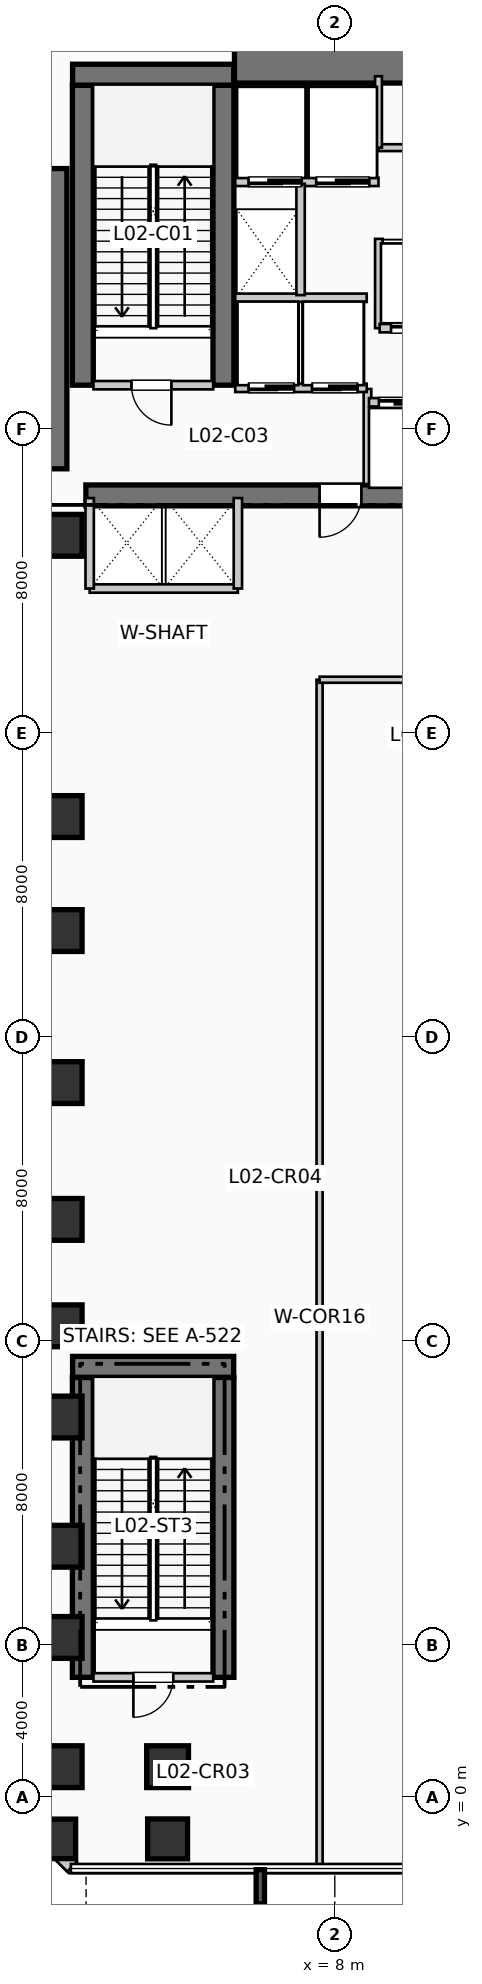
"""IFC4 building model, lengths in metres.
Left out: names, types, materials, properties, quantities, classifications, styles, units other than length and angle.
Written with IfcOpenShell. Run it as: python <this file> out.ifc"""

import sys

from ifc_helpers import new_model, si_unit, direction, frame, frame_2d, origin, origin_2d, place, context, subcontext, project, spatial, rectangle, extrude, element, fill, save


model = new_model("IFC4")
c1 = context("Model", 3, precision=1e-05, world=origin(), true_north=direction((0.0, 1.0)))
c2 = subcontext(c1, "Body", "Model", "MODEL_VIEW")
j1 = project(units=[si_unit("LENGTHUNIT", "METRE"), si_unit("PLANEANGLEUNIT", "RADIAN")], contexts=[c1])
p1 = place(None, origin())
s1 = spatial("IfcSite", under=j1, at=p1, CompositionType="ELEMENT")
p2 = place(p1, origin())
s2 = spatial("IfcBuilding", under=s1, at=p2, CompositionType="ELEMENT")
p3 = place(p2, frame((0.0, 0.0, 11.22)))
s3 = spatial("IfcBuildingStorey", under=s2, at=p3, CompositionType="ELEMENT", Elevation=11.22)
p4 = place(p3, frame((5.36, 45.55, 0.0), z_axis=(0.0, 0.0, 1.0), x_axis=(1.0, 0.0, 0.0)))
e1 = element("IfcWall", 1, at=p4, inside=s3, PredefinedType="SHEAR", context=c2, shape_type="SweptSolid", body=[
    extrude(rectangle(XDim=13.98, YDim=0.9, at=frame_2d((6.99, 0.0))), origin(), (0.0, 0.0, 1.0), 5.28),
])
p5 = place(p3, frame((0.5, 34.95, 0.0), z_axis=(0.0, 0.0, 1.0), x_axis=(0.0, 1.0, 0.0)))
e2 = element("IfcWall", 2, at=p5, inside=s3, PredefinedType="SHEAR", context=c2, shape_type="SweptSolid", body=[
    extrude(rectangle(XDim=7.9, YDim=0.9, at=frame_2d((3.95, 0.0))), origin(), (0.0, 0.0, 1.0), 5.28),
])
p6 = place(p3, frame((1.45, 34.25, 0.0), z_axis=(0.0, 0.0, 1.0), x_axis=(1.0, 0.0, 0.0)))
e3 = element("IfcWall", 3, at=p6, inside=s3, PredefinedType="SHEAR", context=c2, shape_type="SweptSolid", body=[
    extrude(rectangle(XDim=10.71, YDim=0.55, at=frame_2d((5.355, 0.0))), origin(), (0.0, 0.0, 1.0), 5.28),
])
p7 = place(p6, frame((7.25, 0.0, 0.0), z_axis=(0.0, 0.0, 1.0), x_axis=(-1.0, 0.0, 0.0)))
e4 = element("IfcOpeningElement", 4, at=p7, cuts=e3, PredefinedType="OPENING", context=c2, shape_type="SweptSolid", body=[
    extrude(rectangle(XDim=1.1, YDim=2.15, at=frame_2d((0.55, 1.075))), frame((0.0, 0.285, 0.0), z_axis=(0.0, -1.0, 0.0), x_axis=(1.0, 0.0, 0.0)), (0.0, 0.0, 1.0), 0.57),
])
for number, where, z_axis, x_axis in (
    (5, (1.37, 37.15, 0.0), (0.0, 0.0, 1.0), (0.0, 1.0, 0.0)),
    (6, (5.07, 37.15, 0.0), (0.0, 0.0, 1.0), (0.0, 1.0, 0.0)),
):
    element("IfcWall", number, at=place(p3, frame(where, z_axis=z_axis, x_axis=x_axis)), inside=s3, PredefinedType="SHEAR", context=c2, shape_type="SweptSolid", body=[
        extrude(rectangle(XDim=7.89, YDim=0.55, at=frame_2d((3.945, 0.0))), origin(), (0.0, 0.0, 1.0), 5.28),
    ])
p8 = place(p3, frame((1.1, 45.32, 0.0), z_axis=(0.0, 0.0, 1.0), x_axis=(1.0, 0.0, 0.0)))
e7 = element("IfcWall", 7, at=p8, inside=s3, PredefinedType="SHEAR", context=c2, shape_type="SweptSolid", body=[
    extrude(rectangle(XDim=4.24, YDim=0.55, at=frame_2d((2.12, 0.0))), origin(), (0.0, 0.0, 1.0), 5.28),
])
for number, where, z_axis, x_axis in (
    (8, (1.37, 3.15, 0.0), (0.0, 0.0, 1.0), (0.0, 1.0, 0.0)),
    (9, (5.07, 3.15, 0.0), (0.0, 0.0, 1.0), (0.0, 1.0, 0.0)),
):
    element("IfcWall", number, at=place(p3, frame(where, z_axis=z_axis, x_axis=x_axis)), inside=s3, PredefinedType="SHEAR", context=c2, shape_type="SweptSolid", body=[
        extrude(rectangle(XDim=7.89, YDim=0.55, at=frame_2d((3.945, 0.0))), origin(), (0.0, 0.0, 1.0), 5.28),
    ])
p9 = place(p3, frame((1.1, 11.32, 0.0), z_axis=(0.0, 0.0, 1.0), x_axis=(1.0, 0.0, 0.0)))
e10 = element("IfcWall", 10, at=p9, inside=s3, PredefinedType="SHEAR", context=c2, shape_type="SweptSolid", body=[
    extrude(rectangle(XDim=4.24, YDim=0.55, at=frame_2d((2.12, 0.0))), origin(), (0.0, 0.0, 1.0), 5.28),
])
p10 = place(p3, frame((0.8, -1.1, 0.0), z_axis=(0.0, 0.0, 1.0), x_axis=(1.0, 0.0, 0.0)))
e11 = element("IfcColumn", 11, at=p10, inside=s3, PredefinedType="PILASTER", context=c2, shape_type="SweptSolid", body=[
    extrude(rectangle(XDim=0.76, YDim=1.04, at=origin_2d()), origin(), (0.0, 0.0, 1.0), 5.28),
])
for number, where, z_axis, x_axis in (
    (12, (0.8, 0.8, 0.0), (0.0, 0.0, 1.0), (1.0, 0.0, 0.0)),
    (13, (0.8, 4.2, 0.0), (0.0, 0.0, 1.0), (1.0, 0.0, 0.0)),
    (14, (0.8, 6.6, 0.0), (0.0, 0.0, 1.0), (1.0, 0.0, 0.0)),
    (15, (0.8, 10.0, 0.0), (0.0, 0.0, 1.0), (1.0, 0.0, 0.0)),
    (16, (0.8, 12.4, 0.0), (0.0, 0.0, 1.0), (1.0, 0.0, 0.0)),
    (17, (0.8, 15.2, 0.0), (0.0, 0.0, 1.0), (1.0, 0.0, 0.0)),
    (18, (0.8, 18.8, 0.0), (0.0, 0.0, 1.0), (1.0, 0.0, 0.0)),
    (19, (0.8, 22.8, 0.0), (0.0, 0.0, 1.0), (1.0, 0.0, 0.0)),
    (20, (0.8, 25.8, 0.0), (0.0, 0.0, 1.0), (1.0, 0.0, 0.0)),
    (21, (0.8, 33.2, 0.0), (0.0, 0.0, 1.0), (1.0, 0.0, 0.0)),
):
    element("IfcColumn", number, at=place(p3, frame(where, z_axis=z_axis, x_axis=x_axis)), inside=s3, PredefinedType="COLUMN", context=c2, shape_type="SweptSolid", body=[
        extrude(rectangle(XDim=1.1, YDim=1.1, at=origin_2d()), origin(), (0.0, 0.0, 1.0), 5.28),
    ])
p11 = place(p3, frame((3.6, -1.1, 0.0), z_axis=(0.0, 0.0, 1.0), x_axis=(1.0, 0.0, 0.0)))
e22 = element("IfcColumn", 22, at=p11, inside=s3, PredefinedType="COLUMN", context=c2, shape_type="SweptSolid", body=[
    extrude(rectangle(XDim=1.05, YDim=1.05, at=origin_2d()), origin(), (0.0, 0.0, 1.0), 5.28),
])
p12 = place(p3, frame((3.6, 0.8, 0.0), z_axis=(0.0, 0.0, 1.0), x_axis=(1.0, 0.0, 0.0)))
e23 = element("IfcColumn", 23, at=p12, inside=s3, PredefinedType="COLUMN", context=c2, shape_type="SweptSolid", body=[
    extrude(rectangle(XDim=1.1, YDim=1.1, at=origin_2d()), origin(), (0.0, 0.0, 1.0), 5.28),
])
for number, where, z_axis, x_axis in (
    (24, (1.088, 47.834, 0.0), (0.0, 0.0, 1.0), (-0.707, -0.707, 0.0)),
    (25, (-1.834, 1.088, 0.0), (0.0, 0.0, 1.0), (0.707, -0.707, 0.0)),
):
    element("IfcWall", number, at=place(p3, frame(where, z_axis=z_axis, x_axis=x_axis)), inside=s3, PredefinedType="SOLIDWALL", context=c2, shape_type="SweptSolid", body=[
        extrude(rectangle(XDim=4.133, YDim=0.36, at=frame_2d((2.066, 0.0))), origin(), (0.0, 0.0, 1.0), 4.96),
    ])
p13 = place(p3, frame((1.65, 37.15, 0.0), z_axis=(0.0, 0.0, 1.0), x_axis=(1.0, 0.0, 0.0)))
e26 = element("IfcWall", 26, at=p13, inside=s3, PredefinedType="PARTITIONING", context=c2, shape_type="SweptSolid", body=[
    extrude(rectangle(XDim=3.15, YDim=0.22, at=frame_2d((1.575, 0.0))), origin(), (0.0, 0.0, 1.0), 4.96),
])
p14 = place(p13, frame((2.05, 0.0, 0.0), z_axis=(0.0, 0.0, 1.0), x_axis=(-1.0, 0.0, 0.0)))
e27 = element("IfcOpeningElement", 27, at=p14, cuts=e26, PredefinedType="OPENING", context=c2, shape_type="SweptSolid", body=[
    extrude(rectangle(XDim=1.05, YDim=2.15, at=frame_2d((0.525, 1.075))), frame((0.0, 0.12, 0.0), z_axis=(0.0, -1.0, 0.0), x_axis=(1.0, 0.0, 0.0)), (0.0, 0.0, 1.0), 0.24),
])
p15 = place(p3, frame((8.86, 34.55, 0.0), z_axis=(0.0, 0.0, 1.0), x_axis=(0.0, 1.0, 0.0)))
e28 = element("IfcWall", 28, at=p15, inside=s3, PredefinedType="PARTITIONING", context=c2, shape_type="SweptSolid", body=[
    extrude(rectangle(XDim=2.5, YDim=0.2, at=frame_2d((1.25, 0.0))), origin(), (0.0, 0.0, 1.0), 4.96),
])
p16 = place(p3, frame((5.38, 37.08, 0.0), z_axis=(0.0, 0.0, 1.0), x_axis=(1.0, 0.0, 0.0)))
e29 = element("IfcWall", 29, at=p16, inside=s3, PredefinedType="PARTITIONING", context=c2, shape_type="SweptSolid", body=[
    extrude(rectangle(XDim=3.46, YDim=0.22, at=frame_2d((1.73, 0.0))), origin(), (0.0, 0.0, 1.0), 4.96),
])
p17 = place(p16, frame((1.55, 0.0, 0.0), z_axis=(0.0, 0.0, 1.0), x_axis=(-1.0, 0.0, 0.0)))
e30 = element("IfcOpeningElement", 30, at=p17, cuts=e29, PredefinedType="OPENING", context=c2, shape_type="SweptSolid", body=[
    extrude(rectangle(XDim=1.2, YDim=2.2, at=frame_2d((0.6, 1.1))), frame((0.0, 0.12, 0.0), z_axis=(0.0, -1.0, 0.0), x_axis=(1.0, 0.0, 0.0)), (0.0, 0.0, 1.0), 0.24),
])
p18 = place(p16, frame((3.22, 0.0, 0.0), z_axis=(0.0, 0.0, 1.0), x_axis=(-1.0, 0.0, 0.0)))
e31 = element("IfcOpeningElement", 31, at=p18, cuts=e29, PredefinedType="OPENING", context=c2, shape_type="SweptSolid", body=[
    extrude(rectangle(XDim=1.2, YDim=2.2, at=frame_2d((0.6, 1.1))), frame((0.0, 0.12, 0.0), z_axis=(0.0, -1.0, 0.0), x_axis=(1.0, 0.0, 0.0)), (0.0, 0.0, 1.0), 0.24),
])
p19 = place(p3, frame((5.38, 39.45, 0.0), z_axis=(0.0, 0.0, 1.0), x_axis=(1.0, 0.0, 0.0)))
e32 = element("IfcWall", 32, at=p19, inside=s3, PredefinedType="PARTITIONING", context=c2, shape_type="SweptSolid", body=[
    extrude(rectangle(XDim=3.46, YDim=0.22, at=frame_2d((1.73, 0.0))), origin(), (0.0, 0.0, 1.0), 4.96),
])
p20 = place(p3, frame((5.38, 42.5, 0.0), z_axis=(0.0, 0.0, 1.0), x_axis=(1.0, 0.0, 0.0)))
e33 = element("IfcWall", 33, at=p20, inside=s3, PredefinedType="PARTITIONING", context=c2, shape_type="SweptSolid", body=[
    extrude(rectangle(XDim=3.77, YDim=0.22, at=frame_2d((1.885, 0.0))), origin(), (0.0, 0.0, 1.0), 4.96),
])
p21 = place(p20, frame((1.75, 0.0, 0.0), z_axis=(0.0, 0.0, 1.0), x_axis=(-1.0, 0.0, 0.0)))
e34 = element("IfcOpeningElement", 34, at=p21, cuts=e33, PredefinedType="OPENING", context=c2, shape_type="SweptSolid", body=[
    extrude(rectangle(XDim=1.4, YDim=2.2, at=frame_2d((0.7, 1.1))), frame((0.0, 0.12, 0.0), z_axis=(0.0, -1.0, 0.0), x_axis=(1.0, 0.0, 0.0)), (0.0, 0.0, 1.0), 0.24),
])
p22 = place(p20, frame((3.53, 0.0, 0.0), z_axis=(0.0, 0.0, 1.0), x_axis=(-1.0, 0.0, 0.0)))
e35 = element("IfcOpeningElement", 35, at=p22, cuts=e33, PredefinedType="OPENING", context=c2, shape_type="SweptSolid", body=[
    extrude(rectangle(XDim=1.4, YDim=2.2, at=frame_2d((0.7, 1.1))), frame((0.0, 0.12, 0.0), z_axis=(0.0, -1.0, 0.0), x_axis=(1.0, 0.0, 0.0)), (0.0, 0.0, 1.0), 0.24),
])
p23 = place(p3, frame((7.1, 39.52, 0.0), z_axis=(0.0, 0.0, 1.0), x_axis=(0.0, 1.0, 0.0)))
e36 = element("IfcWall", 36, at=p23, inside=s3, PredefinedType="PARTITIONING", context=c2, shape_type="SweptSolid", body=[
    extrude(rectangle(XDim=2.93, YDim=0.22, at=frame_2d((1.465, 0.0))), origin(), (0.0, 0.0, 1.0), 4.96),
])
p24 = place(p3, frame((1.55, 31.8, 0.0), z_axis=(0.0, 0.0, 1.0), x_axis=(1.0, 0.0, 0.0)))
e37 = element("IfcWall", 37, at=p24, inside=s3, PredefinedType="PARTITIONING", context=c2, shape_type="SweptSolid", body=[
    extrude(rectangle(XDim=3.9, YDim=0.22, at=frame_2d((1.95, 0.0))), origin(), (0.0, 0.0, 1.0), 4.96),
])
for number, where, z_axis, x_axis in (
    (38, (1.55, 31.8, 0.0), (0.0, 0.0, 1.0), (0.0, 1.0, 0.0)),
    (39, (5.45, 31.8, 0.0), (0.0, 0.0, 1.0), (0.0, 1.0, 0.0)),
):
    element("IfcWall", number, at=place(p3, frame(where, z_axis=z_axis, x_axis=x_axis)), inside=s3, PredefinedType="PARTITIONING", context=c2, shape_type="SweptSolid", body=[
        extrude(rectangle(XDim=2.38, YDim=0.22, at=frame_2d((1.19, 0.0))), origin(), (0.0, 0.0, 1.0), 4.96),
    ])
p25 = place(p3, frame((9.16, 38.65, 0.0), z_axis=(0.0, 0.0, 1.0), x_axis=(0.0, 1.0, 0.0)))
e40 = element("IfcWall", 40, at=p25, inside=s3, PredefinedType="PARTITIONING", context=c2, shape_type="SweptSolid", body=[
    extrude(rectangle(XDim=2.35, YDim=0.2, at=frame_2d((1.175, 0.0))), origin(), (0.0, 0.0, 1.0), 4.96),
])
p26 = place(p3, frame((8.9, 36.7, 0.0), z_axis=(0.0, 0.0, 1.0), x_axis=(1.0, 0.0, 0.0)))
e41 = element("IfcWall", 41, at=p26, inside=s3, PredefinedType="PARTITIONING", context=c2, shape_type="SweptSolid", body=[
    extrude(rectangle(XDim=3.26, YDim=0.22, at=frame_2d((1.63, 0.0))), origin(), (0.0, 0.0, 1.0), 4.96),
])
p27 = place(p26, frame((0.26, 0.0, 0.0)))
e42 = element("IfcOpeningElement", 42, at=p27, cuts=e41, PredefinedType="OPENING", context=c2, shape_type="SweptSolid", body=[
    extrude(rectangle(XDim=1.1, YDim=2.2, at=frame_2d((0.55, 1.1))), frame((0.0, 0.12, 0.0), z_axis=(0.0, -1.0, 0.0), x_axis=(1.0, 0.0, 0.0)), (0.0, 0.0, 1.0), 0.24),
])
p28 = place(p26, frame((1.88, 0.0, 0.0)))
e43 = element("IfcOpeningElement", 43, at=p28, cuts=e41, PredefinedType="OPENING", context=c2, shape_type="SweptSolid", body=[
    extrude(rectangle(XDim=1.1, YDim=2.2, at=frame_2d((0.55, 1.1))), frame((0.0, 0.12, 0.0), z_axis=(0.0, -1.0, 0.0), x_axis=(1.0, 0.0, 0.0)), (0.0, 0.0, 1.0), 0.24),
])
p29 = place(p3, frame((9.18, 38.65, 0.0), z_axis=(0.0, 0.0, 1.0), x_axis=(1.0, 0.0, 0.0)))
e44 = element("IfcWall", 44, at=p29, inside=s3, PredefinedType="PARTITIONING", context=c2, shape_type="SweptSolid", body=[
    extrude(rectangle(XDim=3.38, YDim=0.22, at=frame_2d((1.69, 0.0))), origin(), (0.0, 0.0, 1.0), 4.96),
])
p30 = place(p29, frame((0.3, 0.0, 0.0)))
e45 = element("IfcOpeningElement", 45, at=p30, cuts=e44, PredefinedType="OPENING", context=c2, shape_type="SweptSolid", body=[
    extrude(rectangle(XDim=1.1, YDim=2.2, at=frame_2d((0.55, 1.1))), frame((0.0, 0.12, 0.0), z_axis=(0.0, -1.0, 0.0), x_axis=(1.0, 0.0, 0.0)), (0.0, 0.0, 1.0), 0.24),
])
p31 = place(p29, frame((1.95, 0.0, 0.0)))
e46 = element("IfcOpeningElement", 46, at=p31, cuts=e44, PredefinedType="OPENING", context=c2, shape_type="SweptSolid", body=[
    extrude(rectangle(XDim=1.1, YDim=2.2, at=frame_2d((0.55, 1.1))), frame((0.0, 0.12, 0.0), z_axis=(0.0, -1.0, 0.0), x_axis=(1.0, 0.0, 0.0)), (0.0, 0.0, 1.0), 0.24),
])
p32 = place(p3, frame((9.15, 43.4, 0.0), z_axis=(0.0, 0.0, 1.0), x_axis=(1.0, 0.0, 0.0)))
e47 = element("IfcWall", 47, at=p32, inside=s3, PredefinedType="PLUMBINGWALL", context=c2, shape_type="SweptSolid", body=[
    extrude(rectangle(XDim=9.33, YDim=0.18, at=frame_2d((4.665, 0.0))), origin(), (0.0, 0.0, 1.0), 4.96),
])
p33 = place(p32, frame((1.88, 0.0, 0.0)))
e48 = element("IfcOpeningElement", 48, at=p33, cuts=e47, PredefinedType="OPENING", context=c2, shape_type="SweptSolid", body=[
    extrude(rectangle(XDim=0.92, YDim=2.1, at=frame_2d((0.46, 1.05))), frame((0.0, 0.1, 0.0), z_axis=(0.0, -1.0, 0.0), x_axis=(1.0, 0.0, 0.0)), (0.0, 0.0, 1.0), 0.2),
])
p34 = place(p32, frame((6.515, 0.0, 0.0)))
e49 = element("IfcOpeningElement", 49, at=p34, cuts=e47, PredefinedType="OPENING", context=c2, shape_type="SweptSolid", body=[
    extrude(rectangle(XDim=0.92, YDim=2.1, at=frame_2d((0.46, 1.05))), frame((0.0, 0.1, 0.0), z_axis=(0.0, -1.0, 0.0), x_axis=(1.0, 0.0, 0.0)), (0.0, 0.0, 1.0), 0.2),
])
p35 = place(p3, frame((9.15, 43.4, 0.0), z_axis=(0.0, 0.0, 1.0), x_axis=(0.0, 1.0, 0.0)))
e50 = element("IfcWall", 50, at=p35, inside=s3, PredefinedType="PLUMBINGWALL", context=c2, shape_type="SweptSolid", body=[
    extrude(rectangle(XDim=1.88, YDim=0.18, at=frame_2d((0.94, 0.0))), origin(), (0.0, 0.0, 1.0), 4.96),
])
p36 = place(p3, frame((1.65, 3.15, 0.0), z_axis=(0.0, 0.0, 1.0), x_axis=(1.0, 0.0, 0.0)))
e51 = element("IfcWall", 51, at=p36, inside=s3, PredefinedType="PARTITIONING", context=c2, shape_type="SweptSolid", body=[
    extrude(rectangle(XDim=3.15, YDim=0.22, at=frame_2d((1.575, 0.0))), origin(), (0.0, 0.0, 1.0), 4.96),
])
p37 = place(p36, frame((2.1, 0.0, 0.0), z_axis=(0.0, 0.0, 1.0), x_axis=(-1.0, 0.0, 0.0)))
e52 = element("IfcOpeningElement", 52, at=p37, cuts=e51, PredefinedType="OPENING", context=c2, shape_type="SweptSolid", body=[
    extrude(rectangle(XDim=1.05, YDim=2.15, at=frame_2d((0.525, 1.075))), frame((0.0, 0.12, 0.0), z_axis=(0.0, -1.0, 0.0), x_axis=(1.0, 0.0, 0.0)), (0.0, 0.0, 1.0), 0.24),
])
p38 = place(p3, frame((7.6, -1.81, 0.0), z_axis=(0.0, 0.0, 1.0), x_axis=(0.0, 1.0, 0.0)))
e53 = element("IfcWall", 53, at=p38, inside=s3, PredefinedType="PARTITIONING", context=c2, shape_type="SweptSolid", body=[
    extrude(rectangle(XDim=31.21, YDim=0.16, at=frame_2d((15.605, 0.0))), origin(), (0.0, 0.0, 1.0), 4.96),
])
p39 = place(p3, frame((7.6, 29.4, 0.0), z_axis=(0.0, 0.0, 1.0), x_axis=(1.0, 0.0, 0.0)))
e54 = element("IfcWall", 54, at=p39, inside=s3, PredefinedType="PARTITIONING", context=c2, shape_type="SweptSolid", body=[
    extrude(rectangle(XDim=43.75, YDim=0.16, at=frame_2d((21.875, 0.0))), origin(), (0.0, 0.0, 1.0), 4.615),
])
p40 = place(p39, frame((2.5, 0.0, 0.0)))
e55 = element("IfcOpeningElement", 55, at=p40, cuts=e54, PredefinedType="OPENING", context=c2, shape_type="SweptSolid", body=[
    extrude(rectangle(XDim=1.8, YDim=2.3, at=frame_2d((0.9, 1.15))), frame((0.0, 0.09, 0.0), z_axis=(0.0, -1.0, 0.0), x_axis=(1.0, 0.0, 0.0)), (0.0, 0.0, 1.0), 0.18),
])
p41 = place(p39, frame((11.0, 0.0, 0.0)))
e56 = element("IfcOpeningElement", 56, at=p41, cuts=e54, PredefinedType="OPENING", context=c2, shape_type="SweptSolid", body=[
    extrude(rectangle(XDim=1.8, YDim=2.3, at=frame_2d((0.9, 1.15))), frame((0.0, 0.09, 0.0), z_axis=(0.0, -1.0, 0.0), x_axis=(1.0, 0.0, 0.0)), (0.0, 0.0, 1.0), 0.18),
])
p42 = place(p39, frame((18.0, 0.0, 0.0)))
e57 = element("IfcOpeningElement", 57, at=p42, cuts=e54, PredefinedType="OPENING", context=c2, shape_type="SweptSolid", body=[
    extrude(rectangle(XDim=1.8, YDim=2.3, at=frame_2d((0.9, 1.15))), frame((0.0, 0.09, 0.0), z_axis=(0.0, -1.0, 0.0), x_axis=(1.0, 0.0, 0.0)), (0.0, 0.0, 1.0), 0.18),
])
p43 = place(p39, frame((26.5, 0.0, 0.0)))
e58 = element("IfcOpeningElement", 58, at=p43, cuts=e54, PredefinedType="OPENING", context=c2, shape_type="SweptSolid", body=[
    extrude(rectangle(XDim=0.95, YDim=2.15, at=frame_2d((0.475, 1.075))), frame((0.0, 0.09, 0.0), z_axis=(0.0, -1.0, 0.0), x_axis=(1.0, 0.0, 0.0)), (0.0, 0.0, 1.0), 0.18),
])
p44 = place(p39, frame((35.0, 0.0, 0.0)))
e59 = element("IfcOpeningElement", 59, at=p44, cuts=e54, PredefinedType="OPENING", context=c2, shape_type="SweptSolid", body=[
    extrude(rectangle(XDim=0.95, YDim=2.15, at=frame_2d((0.475, 1.075))), frame((0.0, 0.09, 0.0), z_axis=(0.0, -1.0, 0.0), x_axis=(1.0, 0.0, 0.0)), (0.0, 0.0, 1.0), 0.18),
])
p45 = place(p14, origin())
e60 = element("IfcDoor", 60, at=p45, inside=s3, OperationType="SINGLE_SWING_RIGHT", PredefinedType="DOOR", context=c2, shape_type="SweptSolid", body=[
    extrude(rectangle(XDim=1.05, YDim=2.15, at=frame_2d((0.525, 1.075))), frame((0.0, 0.025, 0.0), z_axis=(0.0, -1.0, 0.0), x_axis=(1.0, 0.0, 0.0)), (0.0, 0.0, 1.0), 0.05),
])
fill(e27, e60)
p46 = place(p7, origin())
e61 = element("IfcDoor", 61, at=p46, inside=s3, OperationType="SINGLE_SWING_LEFT", PredefinedType="DOOR", context=c2, shape_type="SweptSolid", body=[
    extrude(rectangle(XDim=1.1, YDim=2.15, at=frame_2d((0.55, 1.075))), frame((0.0, 0.025, 0.0), z_axis=(0.0, -1.0, 0.0), x_axis=(1.0, 0.0, 0.0)), (0.0, 0.0, 1.0), 0.05),
])
fill(e4, e61)
p47 = place(p17, origin())
e62 = element("IfcDoor", 62, at=p47, inside=s3, OperationType="SLIDING_TO_RIGHT", PredefinedType="DOOR", context=c2, shape_type="SweptSolid", body=[
    extrude(rectangle(XDim=1.2, YDim=2.2, at=frame_2d((0.6, 1.1))), frame((0.0, 0.025, 0.0), z_axis=(0.0, -1.0, 0.0), x_axis=(1.0, 0.0, 0.0)), (0.0, 0.0, 1.0), 0.05),
])
fill(e30, e62)
p48 = place(p18, origin())
e63 = element("IfcDoor", 63, at=p48, inside=s3, OperationType="SLIDING_TO_RIGHT", PredefinedType="DOOR", context=c2, shape_type="SweptSolid", body=[
    extrude(rectangle(XDim=1.2, YDim=2.2, at=frame_2d((0.6, 1.1))), frame((0.0, 0.025, 0.0), z_axis=(0.0, -1.0, 0.0), x_axis=(1.0, 0.0, 0.0)), (0.0, 0.0, 1.0), 0.05),
])
fill(e31, e63)
p49 = place(p21, origin())
e64 = element("IfcDoor", 64, at=p49, inside=s3, OperationType="SLIDING_TO_LEFT", PredefinedType="DOOR", context=c2, shape_type="SweptSolid", body=[
    extrude(rectangle(XDim=1.4, YDim=2.2, at=frame_2d((0.7, 1.1))), frame((0.0, 0.025, 0.0), z_axis=(0.0, -1.0, 0.0), x_axis=(1.0, 0.0, 0.0)), (0.0, 0.0, 1.0), 0.05),
])
fill(e34, e64)
p50 = place(p22, origin())
e65 = element("IfcDoor", 65, at=p50, inside=s3, OperationType="SLIDING_TO_LEFT", PredefinedType="DOOR", context=c2, shape_type="SweptSolid", body=[
    extrude(rectangle(XDim=1.4, YDim=2.2, at=frame_2d((0.7, 1.1))), frame((0.0, 0.025, 0.0), z_axis=(0.0, -1.0, 0.0), x_axis=(1.0, 0.0, 0.0)), (0.0, 0.0, 1.0), 0.05),
])
fill(e35, e65)
p51 = place(p27, origin())
e66 = element("IfcDoor", 66, at=p51, inside=s3, OperationType="SLIDING_TO_LEFT", PredefinedType="DOOR", context=c2, shape_type="SweptSolid", body=[
    extrude(rectangle(XDim=1.1, YDim=2.2, at=frame_2d((0.55, 1.1))), frame((0.0, 0.025, 0.0), z_axis=(0.0, -1.0, 0.0), x_axis=(1.0, 0.0, 0.0)), (0.0, 0.0, 1.0), 0.05),
])
fill(e42, e66)
p52 = place(p30, origin())
e67 = element("IfcDoor", 67, at=p52, inside=s3, OperationType="SLIDING_TO_LEFT", PredefinedType="DOOR", context=c2, shape_type="SweptSolid", body=[
    extrude(rectangle(XDim=1.1, YDim=2.2, at=frame_2d((0.55, 1.1))), frame((0.0, 0.025, 0.0), z_axis=(0.0, -1.0, 0.0), x_axis=(1.0, 0.0, 0.0)), (0.0, 0.0, 1.0), 0.05),
])
fill(e45, e67)
p53 = place(p37, origin())
e68 = element("IfcDoor", 68, at=p53, inside=s3, OperationType="SINGLE_SWING_LEFT", PredefinedType="DOOR", context=c2, shape_type="SweptSolid", body=[
    extrude(rectangle(XDim=1.05, YDim=2.15, at=frame_2d((0.525, 1.075))), frame((0.0, 0.025, 0.0), z_axis=(0.0, -1.0, 0.0), x_axis=(1.0, 0.0, 0.0)), (0.0, 0.0, 1.0), 0.05),
])
fill(e52, e68)
save(model, sys.argv[1])
